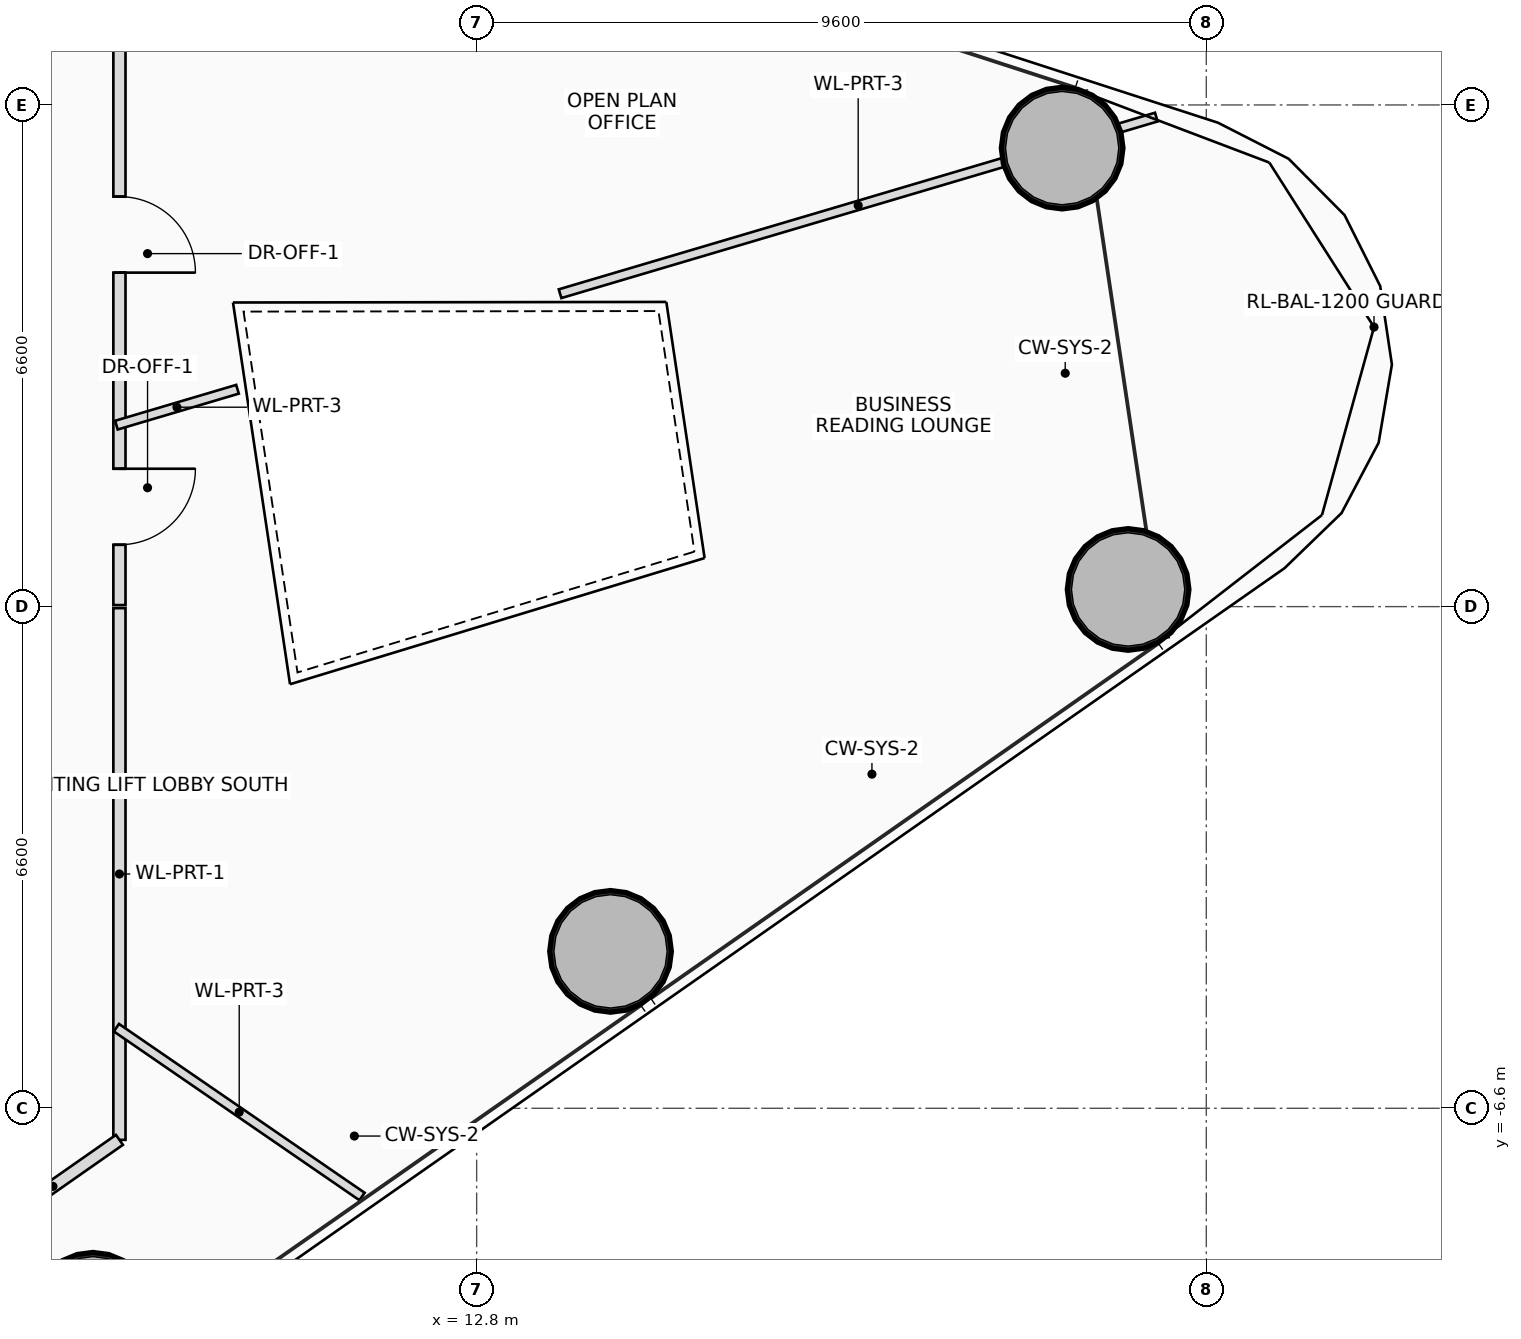
"""IFC4 building model, lengths in metres.
Left out: names, types, materials, properties, quantities, classifications, styles, units other than length and angle.
Written with IfcOpenShell. Run it as: python <this file> out.ifc"""

import sys

from ifc_helpers import new_model, si_unit, direction, frame, frame_2d, origin, origin_2d, place, context, subcontext, project, spatial, rectangle, hollow_circle, extrude, source, transform, mapped, element, fill, save


model = new_model("IFC4")
c1 = context("Model", 3, precision=1e-05, world=origin(), true_north=direction((0.0, 1.0)))
c2 = subcontext(c1, "Body", "Model", "MODEL_VIEW")
j1 = project(units=[si_unit("LENGTHUNIT", "METRE"), si_unit("PLANEANGLEUNIT", "RADIAN")], contexts=[c1])
p1 = place(None, origin())
s1 = spatial("IfcSite", under=j1, at=p1, CompositionType="ELEMENT")
p2 = place(p1, origin())
s2 = spatial("IfcBuilding", under=s1, at=p2, CompositionType="ELEMENT")
p3 = place(p2, frame((0.0, 0.0, 66.05)))
s3 = spatial("IfcBuildingStorey", under=s2, at=p3, CompositionType="ELEMENT", Elevation=66.05)
m1 = source(origin(), c2, "Body", "SweptSolid", [
    extrude(hollow_circle(Radius=0.8, WallThickness=0.055, at=origin_2d()), origin(), (0.0, 0.0, 1.0), 3.75),
])
for number, where, z_axis, x_axis in (
    (1, (7.752, -9.297, 0.0), (0.0, 0.0, 1.0), (1.0, 0.0, 0.0)),
    (2, (14.562, -4.535, 0.0), (0.0, 0.0, 1.0), (1.0, 0.0, 0.0)),
    (3, (21.371, 0.226, 0.0), (0.0, 0.0, 1.0), (1.0, 0.0, 0.0)),
    (4, (20.503, 6.032, 0.0), (0.0, 0.0, 1.0), (1.0, 0.0, 0.0)),
):
    element("IfcColumn", number, at=place(p3, frame(where, z_axis=z_axis, x_axis=x_axis)), inside=s3, PredefinedType="COLUMN", context=c2, shape_type="MappedRepresentation", body=[
        mapped(m1, transform((0.0, 0.0, 0.0), scale=1.0)),
    ])
p4 = place(p3, frame((8.1, 7.55, 0.0), z_axis=(0.0, 0.0, 1.0), x_axis=(0.0, -1.0, 0.0)))
e5 = element("IfcWall", 5, at=p4, inside=s3, PredefinedType="PARTITIONING", context=c2, shape_type="SweptSolid", body=[
    extrude(rectangle(XDim=7.53, YDim=0.16, at=frame_2d((3.765, 0.0))), origin(), (0.0, 0.0, 1.0), 2.85),
])
p5 = place(p4, frame((2.156, 0.0, 0.0)))
e6 = element("IfcOpeningElement", 6, at=p5, cuts=e5, PredefinedType="OPENING", context=c2, shape_type="SweptSolid", body=[
    extrude(rectangle(XDim=1.0, YDim=2.25, at=frame_2d((0.5, 1.125))), frame((0.0, 0.09, 0.0), z_axis=(0.0, -1.0, 0.0), x_axis=(1.0, 0.0, 0.0)), (0.0, 0.0, 1.0), 0.18),
])
p6 = place(p4, frame((5.736, 0.0, 0.0)))
e7 = element("IfcOpeningElement", 7, at=p6, cuts=e5, PredefinedType="OPENING", context=c2, shape_type="SweptSolid", body=[
    extrude(rectangle(XDim=1.0, YDim=2.25, at=frame_2d((0.5, 1.125))), frame((0.0, 0.09, 0.0), z_axis=(0.0, -1.0, 0.0), x_axis=(1.0, 0.0, 0.0)), (0.0, 0.0, 1.0), 0.18),
])
p7 = place(p3, frame((8.1, -0.02, 0.0), z_axis=(0.0, 0.0, 1.0), x_axis=(0.0, -1.0, 0.0)))
e8 = element("IfcWall", 8, at=p7, inside=s3, PredefinedType="PARTITIONING", context=c2, shape_type="SweptSolid", body=[
    extrude(rectangle(XDim=6.995, YDim=0.16, at=frame_2d((3.498, 0.0))), origin(), (0.0, 0.0, 1.0), 2.85),
])
p8 = place(p3, frame((8.1, -7.015, 0.0), z_axis=(0.0, 0.0, 1.0), x_axis=(-0.81953260104, -0.573032560883, 0.0)))
e9 = element("IfcWall", 9, at=p8, inside=s3, PredefinedType="PARTITIONING", context=c2, shape_type="SweptSolid", body=[
    extrude(rectangle(XDim=2.135, YDim=0.16, at=frame_2d((1.068, 0.0))), origin(), (0.0, 0.0, 1.0), 2.85),
])
p9 = place(p3, frame((8.06, -5.54, 0.0), z_axis=(0.0, 0.0, 1.0), x_axis=(0.824103676806, -0.566438990426, 0.0)))
e10 = element("IfcWall", 10, at=p9, inside=s3, PredefinedType="PARTITIONING", context=c2, shape_type="SweptSolid", body=[
    extrude(rectangle(XDim=3.922, YDim=0.12, at=frame_2d((1.961, 0.0))), origin(), (0.0, 0.0, 1.0), 3.01),
])
p10 = place(p3, frame((8.06, 2.387, 0.0), z_axis=(0.0, 0.0, 1.0), x_axis=(0.958783289971, 0.28413835164, 0.0)))
e11 = element("IfcWall", 11, at=p10, inside=s3, PredefinedType="PARTITIONING", context=c2, shape_type="SweptSolid", body=[
    extrude(rectangle(XDim=1.662, YDim=0.12, at=frame_2d((0.831, 0.0))), origin(), (0.0, 0.0, 1.0), 3.21),
])
p11 = place(p3, frame((13.897, 4.117, 0.0), z_axis=(0.0, 0.0, 1.0), x_axis=(0.958827308203, 0.283989776303, 0.0)))
e12 = element("IfcWall", 12, at=p11, inside=s3, PredefinedType="PARTITIONING", context=c2, shape_type="SweptSolid", body=[
    extrude(rectangle(XDim=8.182, YDim=0.12, at=frame_2d((4.091, 0.0))), origin(), (0.0, 0.0, 1.0), 2.85),
])
p12 = place(p5, origin())
e13 = element("IfcDoor", 13, at=p12, inside=s3, OperationType="SINGLE_SWING_RIGHT", PredefinedType="DOOR", context=c2, shape_type="SweptSolid", body=[
    extrude(rectangle(XDim=1.0, YDim=2.25, at=frame_2d((0.5, 1.125))), frame((0.0, 0.025, 0.0), z_axis=(0.0, -1.0, 0.0), x_axis=(1.0, 0.0, 0.0)), (0.0, 0.0, 1.0), 0.05),
])
fill(e6, e13)
p13 = place(p6, origin())
e14 = element("IfcDoor", 14, at=p13, inside=s3, OperationType="SINGLE_SWING_LEFT", PredefinedType="DOOR", context=c2, shape_type="SweptSolid", body=[
    extrude(rectangle(XDim=1.0, YDim=2.25, at=frame_2d((0.5, 1.125))), frame((0.0, 0.025, 0.0), z_axis=(0.0, -1.0, 0.0), x_axis=(1.0, 0.0, 0.0)), (0.0, 0.0, 1.0), 0.05),
])
fill(e7, e14)
save(model, sys.argv[1])
